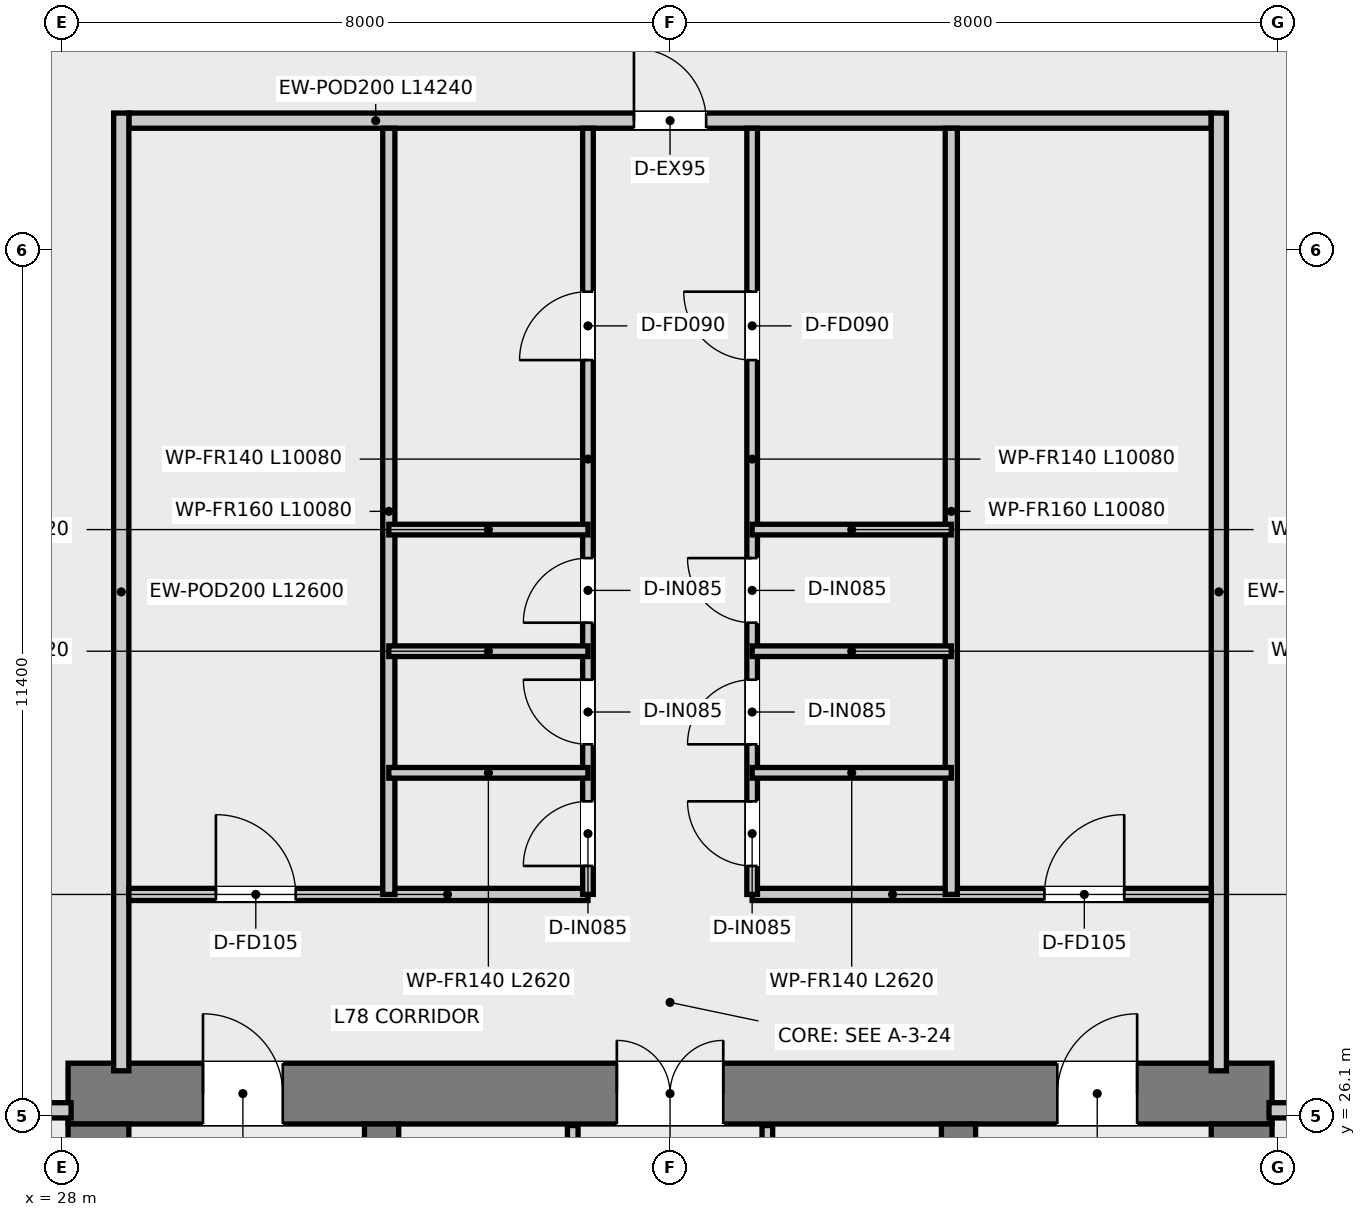
"""IFC4 building model, lengths in metres.
Left out: names, types, materials, properties, quantities, classifications, styles, units other than length and angle.
Written with IfcOpenShell. Run it as: python <this file> out.ifc"""

import sys

from ifc_helpers import new_model, si_unit, direction, frame, frame_2d, origin, place, context, subcontext, project, spatial, rectangle, extrude, element, fill, save


model = new_model("IFC4")
c1 = context("Model", 3, precision=1e-05, world=origin(), true_north=direction((0.0, 1.0)))
c2 = subcontext(c1, "Body", "Model", "MODEL_VIEW")
j1 = project(units=[si_unit("LENGTHUNIT", "METRE"), si_unit("PLANEANGLEUNIT", "RADIAN")], contexts=[c1])
p1 = place(None, origin())
s1 = spatial("IfcSite", under=j1, at=p1, CompositionType="ELEMENT")
p2 = place(p1, origin())
s2 = spatial("IfcBuilding", under=s1, at=p2, CompositionType="ELEMENT")
p3 = place(p2, frame((0.0, 0.0, 318.75)))
s3 = spatial("IfcBuildingStorey", under=s2, at=p3, CompositionType="ELEMENT", Elevation=318.75)
p4 = place(p3, frame((28.08, 26.4, 0.0), z_axis=(0.0, 0.0, 1.0), x_axis=(1.0, 0.0, 0.0)))
e1 = element("IfcWall", 1, at=p4, inside=s3, PredefinedType="SHEAR", context=c2, shape_type="SweptSolid", body=[
    extrude(rectangle(XDim=15.84, YDim=0.8, at=frame_2d((7.92, 0.0))), origin(), (0.0, 0.0, 1.0), 5.0),
])
p5 = place(p4, frame((7.22, 0.0, 0.0)))
e2 = element("IfcOpeningElement", 2, at=p5, cuts=e1, PredefinedType="OPENING", context=c2, shape_type="SweptSolid", body=[
    extrude(rectangle(XDim=1.4, YDim=2.2, at=frame_2d((0.7, 1.1))), frame((0.0, 0.41, 0.0), z_axis=(0.0, -1.0, 0.0), x_axis=(1.0, 0.0, 0.0)), (0.0, 0.0, 1.0), 0.82),
])
p6 = place(p4, frame((1.775, 0.0, 0.0)))
e3 = element("IfcOpeningElement", 3, at=p6, cuts=e1, PredefinedType="OPENING", context=c2, shape_type="SweptSolid", body=[
    extrude(rectangle(XDim=1.05, YDim=2.1, at=frame_2d((0.525, 1.05))), frame((0.0, 0.41, 0.0), z_axis=(0.0, -1.0, 0.0), x_axis=(1.0, 0.0, 0.0)), (0.0, 0.0, 1.0), 0.82),
])
p7 = place(p4, frame((13.015, 0.0, 0.0)))
e4 = element("IfcOpeningElement", 4, at=p7, cuts=e1, PredefinedType="OPENING", context=c2, shape_type="SweptSolid", body=[
    extrude(rectangle(XDim=1.05, YDim=2.1, at=frame_2d((0.525, 1.05))), frame((0.0, 0.41, 0.0), z_axis=(0.0, -1.0, 0.0), x_axis=(1.0, 0.0, 0.0)), (0.0, 0.0, 1.0), 0.82),
])
p8 = place(p3, frame((28.48, 11.3, 0.0), z_axis=(0.0, 0.0, 1.0), x_axis=(0.0, 1.0, 0.0)))
e5 = element("IfcWall", 5, at=p8, inside=s3, PredefinedType="SHEAR", context=c2, shape_type="SweptSolid", body=[
    extrude(rectangle(XDim=14.7, YDim=0.8, at=frame_2d((7.35, 0.0))), origin(), (0.0, 0.0, 1.0), 5.0),
])
p9 = place(p8, frame((11.675, 0.0, 0.0)))
e6 = element("IfcOpeningElement", 6, at=p9, cuts=e5, PredefinedType="OPENING", context=c2, shape_type="SweptSolid", body=[
    extrude(rectangle(XDim=1.05, YDim=2.1, at=frame_2d((0.525, 1.05))), frame((0.0, 0.41, 0.0), z_axis=(0.0, -1.0, 0.0), x_axis=(1.0, 0.0, 0.0)), (0.0, 0.0, 1.0), 0.82),
])
p10 = place(p3, frame((43.52, 11.3, 0.0), z_axis=(0.0, 0.0, 1.0), x_axis=(0.0, 1.0, 0.0)))
e7 = element("IfcWall", 7, at=p10, inside=s3, PredefinedType="SHEAR", context=c2, shape_type="SweptSolid", body=[
    extrude(rectangle(XDim=14.7, YDim=0.8, at=frame_2d((7.35, 0.0))), origin(), (0.0, 0.0, 1.0), 5.0),
])
p11 = place(p10, frame((11.675, 0.0, 0.0)))
e8 = element("IfcOpeningElement", 8, at=p11, cuts=e7, PredefinedType="OPENING", context=c2, shape_type="SweptSolid", body=[
    extrude(rectangle(XDim=1.05, YDim=2.1, at=frame_2d((0.525, 1.05))), frame((0.0, 0.41, 0.0), z_axis=(0.0, -1.0, 0.0), x_axis=(1.0, 0.0, 0.0)), (0.0, 0.0, 1.0), 0.82),
])
p12 = place(p3, frame((32.205, 13.22, 0.0), z_axis=(0.0, 0.0, 1.0), x_axis=(0.0, 1.0, 0.0)))
e9 = element("IfcWall", 9, at=p12, inside=s3, PredefinedType="SHEAR", context=c2, shape_type="SweptSolid", body=[
    extrude(rectangle(XDim=12.78, YDim=0.45, at=frame_2d((6.39, 0.0))), origin(), (0.0, 0.0, 1.0), 5.0),
])
p13 = place(p12, frame((10.58, 0.0, 0.0)))
e10 = element("IfcOpeningElement", 10, at=p13, cuts=e9, PredefinedType="OPENING", context=c2, shape_type="SweptSolid", body=[
    extrude(rectangle(XDim=1.1, YDim=2.15, at=frame_2d((0.55, 1.075))), frame((0.0, 0.235, 0.0), z_axis=(0.0, -1.0, 0.0), x_axis=(1.0, 0.0, 0.0)), (0.0, 0.0, 1.0), 0.47),
])
p14 = place(p3, frame((39.795, 13.22, 0.0), z_axis=(0.0, 0.0, 1.0), x_axis=(0.0, 1.0, 0.0)))
e11 = element("IfcWall", 11, at=p14, inside=s3, PredefinedType="SHEAR", context=c2, shape_type="SweptSolid", body=[
    extrude(rectangle(XDim=12.78, YDim=0.45, at=frame_2d((6.39, 0.0))), origin(), (0.0, 0.0, 1.0), 5.0),
])
p15 = place(p14, frame((10.58, 0.0, 0.0)))
e12 = element("IfcOpeningElement", 12, at=p15, cuts=e11, PredefinedType="OPENING", context=c2, shape_type="SweptSolid", body=[
    extrude(rectangle(XDim=1.1, YDim=2.15, at=frame_2d((0.55, 1.075))), frame((0.0, 0.235, 0.0), z_axis=(0.0, -1.0, 0.0), x_axis=(1.0, 0.0, 0.0)), (0.0, 0.0, 1.0), 0.47),
])
p16 = place(p3, frame((34.72, 20.2, 0.0), z_axis=(0.0, 0.0, 1.0), x_axis=(0.0, 1.0, 0.0)))
e13 = element("IfcWall", 13, at=p16, inside=s3, PredefinedType="PARTITIONING", context=c2, shape_type="SweptSolid", body=[
    extrude(rectangle(XDim=5.78, YDim=0.14, at=frame_2d((2.89, 0.0))), origin(), (0.0, 0.0, 1.0), 3.87),
])
p17 = place(p16, frame((1.05, 0.0, 0.0)))
e14 = element("IfcOpeningElement", 14, at=p17, cuts=e13, PredefinedType="OPENING", context=c2, shape_type="SweptSolid", body=[
    extrude(rectangle(XDim=0.9, YDim=2.1, at=frame_2d((0.45, 1.05))), frame((0.0, 0.08, 0.0), z_axis=(0.0, -1.0, 0.0), x_axis=(1.0, 0.0, 0.0)), (0.0, 0.0, 1.0), 0.16),
])
p18 = place(p3, frame((37.28, 20.2, 0.0), z_axis=(0.0, 0.0, 1.0), x_axis=(0.0, 1.0, 0.0)))
e15 = element("IfcWall", 15, at=p18, inside=s3, PredefinedType="PARTITIONING", context=c2, shape_type="SweptSolid", body=[
    extrude(rectangle(XDim=5.78, YDim=0.14, at=frame_2d((2.89, 0.0))), origin(), (0.0, 0.0, 1.0), 3.87),
])
p19 = place(p18, frame((0.95, 0.0, 0.0)))
e16 = element("IfcOpeningElement", 16, at=p19, cuts=e15, PredefinedType="OPENING", context=c2, shape_type="SweptSolid", body=[
    extrude(rectangle(XDim=1.1, YDim=2.15, at=frame_2d((0.55, 1.075))), frame((0.0, 0.08, 0.0), z_axis=(0.0, -1.0, 0.0), x_axis=(1.0, 0.0, 0.0)), (0.0, 0.0, 1.0), 0.16),
])
p20 = place(p3, frame((28.88, 39.2, 0.0), z_axis=(0.0, 0.0, 1.0), x_axis=(1.0, 0.0, 0.0)))
e17 = element("IfcWall", 17, at=p20, inside=s3, PredefinedType="SOLIDWALL", context=c2, shape_type="SweptSolid", body=[
    extrude(rectangle(XDim=14.24, YDim=0.2, at=frame_2d((7.12, 0.0))), origin(), (0.0, 0.0, 1.0), 4.23),
])
p21 = place(p20, frame((6.645, 0.0, 0.0)))
e18 = element("IfcOpeningElement", 18, at=p21, cuts=e17, PredefinedType="OPENING", context=c2, shape_type="SweptSolid", body=[
    extrude(rectangle(XDim=0.95, YDim=2.1, at=frame_2d((0.475, 1.05))), frame((0.0, 0.11, 0.0), z_axis=(0.0, -1.0, 0.0), x_axis=(1.0, 0.0, 0.0)), (0.0, 0.0, 1.0), 0.22),
])
for number, where, z_axis, x_axis in (
    (19, (28.78, 26.7, 0.0), (0.0, 0.0, 1.0), (0.0, 1.0, 0.0)),
    (20, (43.22, 26.7, 0.0), (0.0, 0.0, 1.0), (0.0, 1.0, 0.0)),
):
    element("IfcWall", number, at=place(p3, frame(where, z_axis=z_axis, x_axis=x_axis)), inside=s3, PredefinedType="SOLIDWALL", context=c2, shape_type="SweptSolid", body=[
        extrude(rectangle(XDim=12.6, YDim=0.2, at=frame_2d((6.3, 0.0))), origin(), (0.0, 0.0, 1.0), 4.18),
    ])
for number, where, z_axis, x_axis in (
    (21, (24.58, 26.18, 0.0), (0.0, 0.0, 1.0), (1.0, 0.0, 0.0)),
    (22, (43.88, 26.18, 0.0), (0.0, 0.0, 1.0), (1.0, 0.0, 0.0)),
):
    element("IfcWall", number, at=place(p3, frame(where, z_axis=z_axis, x_axis=x_axis)), inside=s3, PredefinedType="SOLIDWALL", context=c2, shape_type="SweptSolid", body=[
        extrude(rectangle(XDim=3.54, YDim=0.2, at=frame_2d((1.77, 0.0))), origin(), (0.0, 0.0, 1.0), 4.18),
    ])
p22 = place(p3, frame((28.88, 29.02, 0.0), z_axis=(0.0, 0.0, 1.0), x_axis=(1.0, 0.0, 0.0)))
e23 = element("IfcWall", 23, at=p22, inside=s3, PredefinedType="PARTITIONING", context=c2, shape_type="SweptSolid", body=[
    extrude(rectangle(XDim=6.04, YDim=0.16, at=frame_2d((3.02, 0.0))), origin(), (0.0, 0.0, 1.0), 4.23),
])
p23 = place(p22, frame((1.145, 0.0, 0.0)))
e24 = element("IfcOpeningElement", 24, at=p23, cuts=e23, PredefinedType="OPENING", context=c2, shape_type="SweptSolid", body=[
    extrude(rectangle(XDim=1.05, YDim=2.1, at=frame_2d((0.525, 1.05))), frame((0.0, 0.09, 0.0), z_axis=(0.0, -1.0, 0.0), x_axis=(1.0, 0.0, 0.0)), (0.0, 0.0, 1.0), 0.18),
])
p24 = place(p3, frame((37.08, 29.02, 0.0), z_axis=(0.0, 0.0, 1.0), x_axis=(1.0, 0.0, 0.0)))
e25 = element("IfcWall", 25, at=p24, inside=s3, PredefinedType="PARTITIONING", context=c2, shape_type="SweptSolid", body=[
    extrude(rectangle(XDim=6.04, YDim=0.16, at=frame_2d((3.02, 0.0))), origin(), (0.0, 0.0, 1.0), 4.23),
])
p25 = place(p24, frame((3.845, 0.0, 0.0)))
e26 = element("IfcOpeningElement", 26, at=p25, cuts=e25, PredefinedType="OPENING", context=c2, shape_type="SweptSolid", body=[
    extrude(rectangle(XDim=1.05, YDim=2.1, at=frame_2d((0.525, 1.05))), frame((0.0, 0.09, 0.0), z_axis=(0.0, -1.0, 0.0), x_axis=(1.0, 0.0, 0.0)), (0.0, 0.0, 1.0), 0.18),
])
for number, where, z_axis, x_axis in (
    (27, (32.3, 29.02, 0.0), (0.0, 0.0, 1.0), (0.0, 1.0, 0.0)),
    (28, (39.7, 29.02, 0.0), (0.0, 0.0, 1.0), (0.0, 1.0, 0.0)),
):
    element("IfcWall", number, at=place(p3, frame(where, z_axis=z_axis, x_axis=x_axis)), inside=s3, PredefinedType="PARTITIONING", context=c2, shape_type="SweptSolid", body=[
        extrude(rectangle(XDim=10.08, YDim=0.16, at=frame_2d((5.04, 0.0))), origin(), (0.0, 0.0, 1.0), 4.18),
    ])
p26 = place(p3, frame((34.92, 29.02, 0.0), z_axis=(0.0, 0.0, 1.0), x_axis=(0.0, 1.0, 0.0)))
e29 = element("IfcWall", 29, at=p26, inside=s3, PredefinedType="PARTITIONING", context=c2, shape_type="SweptSolid", body=[
    extrude(rectangle(XDim=10.08, YDim=0.14, at=frame_2d((5.04, 0.0))), origin(), (0.0, 0.0, 1.0), 4.18),
])
p27 = place(p26, frame((7.03, 0.0, 0.0)))
e30 = element("IfcOpeningElement", 30, at=p27, cuts=e29, PredefinedType="OPENING", context=c2, shape_type="SweptSolid", body=[
    extrude(rectangle(XDim=0.9, YDim=2.1, at=frame_2d((0.45, 1.05))), frame((0.0, 0.08, 0.0), z_axis=(0.0, -1.0, 0.0), x_axis=(1.0, 0.0, 0.0)), (0.0, 0.0, 1.0), 0.16),
])
p28 = place(p26, frame((0.375, 0.0, 0.0)))
e31 = element("IfcOpeningElement", 31, at=p28, cuts=e29, PredefinedType="OPENING", context=c2, shape_type="SweptSolid", body=[
    extrude(rectangle(XDim=0.85, YDim=2.1, at=frame_2d((0.425, 1.05))), frame((0.0, 0.08, 0.0), z_axis=(0.0, -1.0, 0.0), x_axis=(1.0, 0.0, 0.0)), (0.0, 0.0, 1.0), 0.16),
])
p29 = place(p26, frame((1.975, 0.0, 0.0)))
e32 = element("IfcOpeningElement", 32, at=p29, cuts=e29, PredefinedType="OPENING", context=c2, shape_type="SweptSolid", body=[
    extrude(rectangle(XDim=0.85, YDim=2.1, at=frame_2d((0.425, 1.05))), frame((0.0, 0.08, 0.0), z_axis=(0.0, -1.0, 0.0), x_axis=(1.0, 0.0, 0.0)), (0.0, 0.0, 1.0), 0.16),
])
p30 = place(p26, frame((3.575, 0.0, 0.0)))
e33 = element("IfcOpeningElement", 33, at=p30, cuts=e29, PredefinedType="OPENING", context=c2, shape_type="SweptSolid", body=[
    extrude(rectangle(XDim=0.85, YDim=2.1, at=frame_2d((0.425, 1.05))), frame((0.0, 0.08, 0.0), z_axis=(0.0, -1.0, 0.0), x_axis=(1.0, 0.0, 0.0)), (0.0, 0.0, 1.0), 0.16),
])
p31 = place(p3, frame((37.08, 29.02, 0.0), z_axis=(0.0, 0.0, 1.0), x_axis=(0.0, 1.0, 0.0)))
e34 = element("IfcWall", 34, at=p31, inside=s3, PredefinedType="PARTITIONING", context=c2, shape_type="SweptSolid", body=[
    extrude(rectangle(XDim=10.08, YDim=0.14, at=frame_2d((5.04, 0.0))), origin(), (0.0, 0.0, 1.0), 4.18),
])
p32 = place(p31, frame((7.03, 0.0, 0.0)))
e35 = element("IfcOpeningElement", 35, at=p32, cuts=e34, PredefinedType="OPENING", context=c2, shape_type="SweptSolid", body=[
    extrude(rectangle(XDim=0.9, YDim=2.1, at=frame_2d((0.45, 1.05))), frame((0.0, 0.08, 0.0), z_axis=(0.0, -1.0, 0.0), x_axis=(1.0, 0.0, 0.0)), (0.0, 0.0, 1.0), 0.16),
])
p33 = place(p31, frame((0.375, 0.0, 0.0)))
e36 = element("IfcOpeningElement", 36, at=p33, cuts=e34, PredefinedType="OPENING", context=c2, shape_type="SweptSolid", body=[
    extrude(rectangle(XDim=0.85, YDim=2.1, at=frame_2d((0.425, 1.05))), frame((0.0, 0.08, 0.0), z_axis=(0.0, -1.0, 0.0), x_axis=(1.0, 0.0, 0.0)), (0.0, 0.0, 1.0), 0.16),
])
p34 = place(p31, frame((1.975, 0.0, 0.0)))
e37 = element("IfcOpeningElement", 37, at=p34, cuts=e34, PredefinedType="OPENING", context=c2, shape_type="SweptSolid", body=[
    extrude(rectangle(XDim=0.85, YDim=2.1, at=frame_2d((0.425, 1.05))), frame((0.0, 0.08, 0.0), z_axis=(0.0, -1.0, 0.0), x_axis=(1.0, 0.0, 0.0)), (0.0, 0.0, 1.0), 0.16),
])
p35 = place(p31, frame((3.575, 0.0, 0.0)))
e38 = element("IfcOpeningElement", 38, at=p35, cuts=e34, PredefinedType="OPENING", context=c2, shape_type="SweptSolid", body=[
    extrude(rectangle(XDim=0.85, YDim=2.1, at=frame_2d((0.425, 1.05))), frame((0.0, 0.08, 0.0), z_axis=(0.0, -1.0, 0.0), x_axis=(1.0, 0.0, 0.0)), (0.0, 0.0, 1.0), 0.16),
])
for number, where, z_axis, x_axis in (
    (39, (32.3, 33.82, 0.0), (0.0, 0.0, 1.0), (1.0, 0.0, 0.0)),
    (40, (37.08, 33.82, 0.0), (0.0, 0.0, 1.0), (1.0, 0.0, 0.0)),
):
    element("IfcWall", number, at=place(p3, frame(where, z_axis=z_axis, x_axis=x_axis)), inside=s3, PredefinedType="PARTITIONING", context=c2, shape_type="SweptSolid", body=[
        extrude(rectangle(XDim=2.62, YDim=0.14, at=frame_2d((1.31, 0.0))), origin(), (0.0, 0.0, 1.0), 4.36),
    ])
for number, where, z_axis, x_axis in (
    (41, (32.3, 30.62, 0.0), (0.0, 0.0, 1.0), (1.0, 0.0, 0.0)),
    (42, (32.3, 32.22, 0.0), (0.0, 0.0, 1.0), (1.0, 0.0, 0.0)),
    (43, (37.08, 30.62, 0.0), (0.0, 0.0, 1.0), (1.0, 0.0, 0.0)),
    (44, (37.08, 32.22, 0.0), (0.0, 0.0, 1.0), (1.0, 0.0, 0.0)),
):
    element("IfcWall", number, at=place(p3, frame(where, z_axis=z_axis, x_axis=x_axis)), inside=s3, PredefinedType="PARTITIONING", context=c2, shape_type="SweptSolid", body=[
        extrude(rectangle(XDim=2.62, YDim=0.14, at=frame_2d((1.31, 0.0))), origin(), (0.0, 0.0, 1.0), 4.72),
    ])
p36 = place(p5, origin())
e45 = element("IfcDoor", 45, at=p36, inside=s3, OperationType="DOUBLE_DOOR_SINGLE_SWING", PredefinedType="DOOR", context=c2, shape_type="SweptSolid", body=[
    extrude(rectangle(XDim=1.4, YDim=2.2, at=frame_2d((0.7, 1.1))), frame((0.0, 0.025, 0.0), z_axis=(0.0, -1.0, 0.0), x_axis=(1.0, 0.0, 0.0)), (0.0, 0.0, 1.0), 0.05),
])
fill(e2, e45)
p37 = place(p6, origin())
e46 = element("IfcDoor", 46, at=p37, inside=s3, OperationType="SINGLE_SWING_LEFT", PredefinedType="DOOR", context=c2, shape_type="SweptSolid", body=[
    extrude(rectangle(XDim=1.05, YDim=2.1, at=frame_2d((0.525, 1.05))), frame((0.0, 0.025, 0.0), z_axis=(0.0, -1.0, 0.0), x_axis=(1.0, 0.0, 0.0)), (0.0, 0.0, 1.0), 0.05),
])
fill(e3, e46)
p38 = place(p7, origin())
e47 = element("IfcDoor", 47, at=p38, inside=s3, OperationType="SINGLE_SWING_RIGHT", PredefinedType="DOOR", context=c2, shape_type="SweptSolid", body=[
    extrude(rectangle(XDim=1.05, YDim=2.1, at=frame_2d((0.525, 1.05))), frame((0.0, 0.025, 0.0), z_axis=(0.0, -1.0, 0.0), x_axis=(1.0, 0.0, 0.0)), (0.0, 0.0, 1.0), 0.05),
])
fill(e4, e47)
p39 = place(p23, origin())
e48 = element("IfcDoor", 48, at=p39, inside=s3, OperationType="SINGLE_SWING_LEFT", PredefinedType="DOOR", context=c2, shape_type="SweptSolid", body=[
    extrude(rectangle(XDim=1.05, YDim=2.1, at=frame_2d((0.525, 1.05))), frame((0.0, 0.025, 0.0), z_axis=(0.0, -1.0, 0.0), x_axis=(1.0, 0.0, 0.0)), (0.0, 0.0, 1.0), 0.05),
])
fill(e24, e48)
p40 = place(p25, origin())
e49 = element("IfcDoor", 49, at=p40, inside=s3, OperationType="SINGLE_SWING_RIGHT", PredefinedType="DOOR", context=c2, shape_type="SweptSolid", body=[
    extrude(rectangle(XDim=1.05, YDim=2.1, at=frame_2d((0.525, 1.05))), frame((0.0, 0.025, 0.0), z_axis=(0.0, -1.0, 0.0), x_axis=(1.0, 0.0, 0.0)), (0.0, 0.0, 1.0), 0.05),
])
fill(e26, e49)
p41 = place(p27, origin())
e50 = element("IfcDoor", 50, at=p41, inside=s3, OperationType="SINGLE_SWING_LEFT", PredefinedType="DOOR", context=c2, shape_type="SweptSolid", body=[
    extrude(rectangle(XDim=0.9, YDim=2.1, at=frame_2d((0.45, 1.05))), frame((0.0, 0.025, 0.0), z_axis=(0.0, -1.0, 0.0), x_axis=(1.0, 0.0, 0.0)), (0.0, 0.0, 1.0), 0.05),
])
fill(e30, e50)
p42 = place(p32, origin())
e51 = element("IfcDoor", 51, at=p42, inside=s3, OperationType="SINGLE_SWING_RIGHT", PredefinedType="DOOR", context=c2, shape_type="SweptSolid", body=[
    extrude(rectangle(XDim=0.9, YDim=2.1, at=frame_2d((0.45, 1.05))), frame((0.0, 0.025, 0.0), z_axis=(0.0, -1.0, 0.0), x_axis=(1.0, 0.0, 0.0)), (0.0, 0.0, 1.0), 0.05),
])
fill(e35, e51)
p43 = place(p28, origin())
e52 = element("IfcDoor", 52, at=p43, inside=s3, OperationType="SINGLE_SWING_LEFT", PredefinedType="DOOR", context=c2, shape_type="SweptSolid", body=[
    extrude(rectangle(XDim=0.85, YDim=2.1, at=frame_2d((0.425, 1.05))), frame((0.0, 0.025, 0.0), z_axis=(0.0, -1.0, 0.0), x_axis=(1.0, 0.0, 0.0)), (0.0, 0.0, 1.0), 0.05),
])
fill(e31, e52)
p44 = place(p29, origin())
e53 = element("IfcDoor", 53, at=p44, inside=s3, OperationType="SINGLE_SWING_RIGHT", PredefinedType="DOOR", context=c2, shape_type="SweptSolid", body=[
    extrude(rectangle(XDim=0.85, YDim=2.1, at=frame_2d((0.425, 1.05))), frame((0.0, 0.025, 0.0), z_axis=(0.0, -1.0, 0.0), x_axis=(1.0, 0.0, 0.0)), (0.0, 0.0, 1.0), 0.05),
])
fill(e32, e53)
p45 = place(p30, origin())
e54 = element("IfcDoor", 54, at=p45, inside=s3, OperationType="SINGLE_SWING_LEFT", PredefinedType="DOOR", context=c2, shape_type="SweptSolid", body=[
    extrude(rectangle(XDim=0.85, YDim=2.1, at=frame_2d((0.425, 1.05))), frame((0.0, 0.025, 0.0), z_axis=(0.0, -1.0, 0.0), x_axis=(1.0, 0.0, 0.0)), (0.0, 0.0, 1.0), 0.05),
])
fill(e33, e54)
p46 = place(p33, origin())
e55 = element("IfcDoor", 55, at=p46, inside=s3, OperationType="SINGLE_SWING_RIGHT", PredefinedType="DOOR", context=c2, shape_type="SweptSolid", body=[
    extrude(rectangle(XDim=0.85, YDim=2.1, at=frame_2d((0.425, 1.05))), frame((0.0, 0.025, 0.0), z_axis=(0.0, -1.0, 0.0), x_axis=(1.0, 0.0, 0.0)), (0.0, 0.0, 1.0), 0.05),
])
fill(e36, e55)
p47 = place(p34, origin())
e56 = element("IfcDoor", 56, at=p47, inside=s3, OperationType="SINGLE_SWING_LEFT", PredefinedType="DOOR", context=c2, shape_type="SweptSolid", body=[
    extrude(rectangle(XDim=0.85, YDim=2.1, at=frame_2d((0.425, 1.05))), frame((0.0, 0.025, 0.0), z_axis=(0.0, -1.0, 0.0), x_axis=(1.0, 0.0, 0.0)), (0.0, 0.0, 1.0), 0.05),
])
fill(e37, e56)
p48 = place(p35, origin())
e57 = element("IfcDoor", 57, at=p48, inside=s3, OperationType="SINGLE_SWING_RIGHT", PredefinedType="DOOR", context=c2, shape_type="SweptSolid", body=[
    extrude(rectangle(XDim=0.85, YDim=2.1, at=frame_2d((0.425, 1.05))), frame((0.0, 0.025, 0.0), z_axis=(0.0, -1.0, 0.0), x_axis=(1.0, 0.0, 0.0)), (0.0, 0.0, 1.0), 0.05),
])
fill(e38, e57)
p49 = place(p21, origin())
e58 = element("IfcDoor", 58, at=p49, inside=s3, OperationType="SINGLE_SWING_LEFT", PredefinedType="DOOR", context=c2, shape_type="SweptSolid", body=[
    extrude(rectangle(XDim=0.95, YDim=2.1, at=frame_2d((0.475, 1.05))), frame((0.0, 0.025, 0.0), z_axis=(0.0, -1.0, 0.0), x_axis=(1.0, 0.0, 0.0)), (0.0, 0.0, 1.0), 0.05),
])
fill(e18, e58)
save(model, sys.argv[1])
